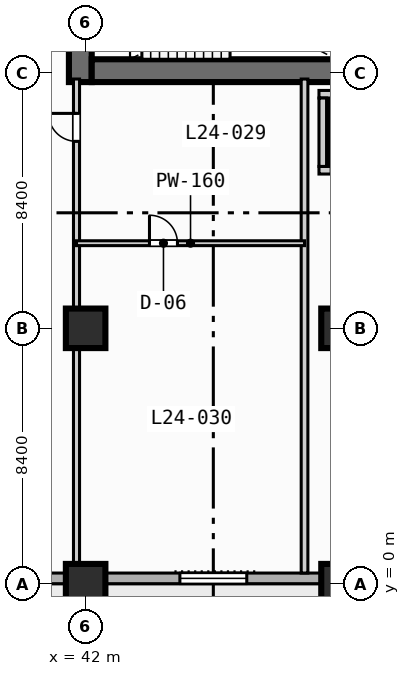
"""IFC4 building model, lengths in metres.
Left out: names, types, materials, properties, quantities, classifications, styles, units other than length and angle.
Written with IfcOpenShell. Run it as: python <this file> out.ifc"""

import sys

from ifc_helpers import new_model, si_unit, direction, frame, frame_2d, origin, origin_2d, place, context, subcontext, project, spatial, rectangle, extrude, element, fill, save


model = new_model("IFC4")
c1 = context("Model", 3, precision=1e-05, world=origin(), true_north=direction((0.0, 1.0)))
c2 = subcontext(c1, "Body", "Model", "MODEL_VIEW")
j1 = project(units=[si_unit("LENGTHUNIT", "METRE"), si_unit("PLANEANGLEUNIT", "RADIAN")], contexts=[c1])
p1 = place(None, origin())
s1 = spatial("IfcSite", under=j1, at=p1, CompositionType="ELEMENT")
p2 = place(p1, origin())
s2 = spatial("IfcBuilding", under=s1, at=p2, CompositionType="ELEMENT")
p3 = place(p2, frame((0.0, 0.0, 103.8)))
s3 = spatial("IfcBuildingStorey", under=s2, at=p3, CompositionType="ELEMENT", Elevation=103.8)
p4 = place(p3, frame((41.825, 16.5, 0.0), z_axis=(0.0, 0.0, 1.0), x_axis=(0.0, 1.0, 0.0)))
e1 = element("IfcWall", 1, at=p4, inside=s3, PredefinedType="SHEAR", context=c2, shape_type="SweptSolid", body=[
    extrude(rectangle(XDim=1.5, YDim=0.75, at=frame_2d((0.75, 0.0))), origin(), (0.0, 0.0, 1.0), 3.55),
])
p5 = place(p3, frame((42.2, 16.875, 0.0), z_axis=(0.0, 0.0, 1.0), x_axis=(1.0, 0.0, 0.0)))
e2 = element("IfcWall", 2, at=p5, inside=s3, PredefinedType="SHEAR", context=c2, shape_type="SweptSolid", body=[
    extrude(rectangle(XDim=16.35, YDim=0.75, at=frame_2d((8.175, 0.0))), origin(), (0.0, 0.0, 1.0), 3.55),
])
for number, where, z_axis, x_axis in (
    (3, (42.0, 0.0, 0.0), (0.0, 0.0, 1.0), (1.0, 0.0, 0.0)),
    (4, (42.0, 8.4, 0.0), (0.0, 0.0, 1.0), (1.0, 0.0, 0.0)),
    (5, (50.4, 0.0, 0.0), (0.0, 0.0, 1.0), (1.0, 0.0, 0.0)),
    (6, (50.4, 8.4, 0.0), (0.0, 0.0, 1.0), (1.0, 0.0, 0.0)),
):
    element("IfcColumn", number, at=place(p3, frame(where, z_axis=z_axis, x_axis=x_axis)), inside=s3, PredefinedType="COLUMN", context=c2, shape_type="SweptSolid", body=[
        extrude(rectangle(XDim=1.3, YDim=1.3, at=origin_2d()), origin(), (0.0, 0.0, 1.0), 3.8),
    ])
p6 = place(p3, frame((72.425, 0.175, 0.0), z_axis=(0.0, 0.0, 1.0), x_axis=(-1.0, 0.0, 0.0)))
e7 = element("IfcWall", 7, at=p6, inside=s3, PredefinedType="STANDARD", context=c2, shape_type="SweptSolid", body=[
    extrude(rectangle(XDim=69.25, YDim=0.35, at=frame_2d((34.625, 0.0))), origin(), (0.0, 0.0, 1.0), 3.55),
])
p7 = place(p6, frame((50.225, 0.0, 0.0)))
e8 = element("IfcOpeningElement", 8, at=p7, cuts=e7, PredefinedType="OPENING", context=c2, shape_type="SweptSolid", body=[
    extrude(rectangle(XDim=1.4, YDim=2.2, at=frame_2d((0.7, 1.1))), frame((0.0, 0.185, 0.0), z_axis=(0.0, -1.0, 0.0), x_axis=(1.0, 0.0, 0.0)), (0.0, 0.0, 1.0), 0.37),
])
p8 = place(p6, frame((33.525, 0.0, 0.85)))
e9 = element("IfcOpeningElement", 9, at=p8, cuts=e7, PredefinedType="OPENING", context=c2, shape_type="SweptSolid", body=[
    extrude(rectangle(XDim=2.2, YDim=1.8, at=frame_2d((1.1, 0.9))), frame((0.0, 0.185, 0.0), z_axis=(0.0, -1.0, 0.0), x_axis=(1.0, 0.0, 0.0)), (0.0, 0.0, 1.0), 0.37),
])
p9 = place(p6, frame((25.125, 0.0, 0.85)))
e10 = element("IfcOpeningElement", 10, at=p9, cuts=e7, PredefinedType="OPENING", context=c2, shape_type="SweptSolid", body=[
    extrude(rectangle(XDim=2.2, YDim=1.8, at=frame_2d((1.1, 0.9))), frame((0.0, 0.185, 0.0), z_axis=(0.0, -1.0, 0.0), x_axis=(1.0, 0.0, 0.0)), (0.0, 0.0, 1.0), 0.37),
])
p10 = place(p6, frame((8.325, 0.0, 0.85)))
e11 = element("IfcOpeningElement", 11, at=p10, cuts=e7, PredefinedType="OPENING", context=c2, shape_type="SweptSolid", body=[
    extrude(rectangle(XDim=2.2, YDim=1.8, at=frame_2d((1.1, 0.9))), frame((0.0, 0.185, 0.0), z_axis=(0.0, -1.0, 0.0), x_axis=(1.0, 0.0, 0.0)), (0.0, 0.0, 1.0), 0.37),
])
p11 = place(p6, frame((64.925, 0.0, 0.85)))
e12 = element("IfcOpeningElement", 12, at=p11, cuts=e7, PredefinedType="OPENING", context=c2, shape_type="SweptSolid", body=[
    extrude(rectangle(XDim=1.8, YDim=1.8, at=frame_2d((0.9, 0.9))), frame((0.0, 0.185, 0.0), z_axis=(0.0, -1.0, 0.0), x_axis=(1.0, 0.0, 0.0)), (0.0, 0.0, 1.0), 0.37),
])
p12 = place(p6, frame((56.525, 0.0, 0.85)))
e13 = element("IfcOpeningElement", 13, at=p12, cuts=e7, PredefinedType="OPENING", context=c2, shape_type="SweptSolid", body=[
    extrude(rectangle(XDim=1.8, YDim=1.8, at=frame_2d((0.9, 0.9))), frame((0.0, 0.185, 0.0), z_axis=(0.0, -1.0, 0.0), x_axis=(1.0, 0.0, 0.0)), (0.0, 0.0, 1.0), 0.37),
])
p13 = place(p6, frame((2.125, 0.0, 0.85)))
e14 = element("IfcOpeningElement", 14, at=p13, cuts=e7, PredefinedType="OPENING", context=c2, shape_type="SweptSolid", body=[
    extrude(rectangle(XDim=1.8, YDim=1.8, at=frame_2d((0.9, 0.9))), frame((0.0, 0.185, 0.0), z_axis=(0.0, -1.0, 0.0), x_axis=(1.0, 0.0, 0.0)), (0.0, 0.0, 1.0), 0.37),
])
p14 = place(p3, frame((49.675, 13.6, 0.0), z_axis=(0.0, 0.0, 1.0), x_axis=(1.0, 0.0, 0.0)))
e15 = element("IfcWall", 15, at=p14, inside=s3, PredefinedType="SOLIDWALL", context=c2, shape_type="SweptSolid", body=[
    extrude(rectangle(XDim=2.25, YDim=0.25, at=frame_2d((1.125, 0.0))), origin(), (0.0, 0.0, 1.0), 3.55),
])
p15 = place(p14, frame((0.4, 0.0, 0.0)))
e16 = element("IfcOpeningElement", 16, at=p15, cuts=e15, PredefinedType="OPENING", context=c2, shape_type="SweptSolid", body=[
    extrude(rectangle(XDim=1.1, YDim=2.15, at=frame_2d((0.55, 1.075))), frame((0.0, 0.135, 0.0), z_axis=(0.0, -1.0, 0.0), x_axis=(1.0, 0.0, 0.0)), (0.0, 0.0, 1.0), 0.27),
])
for number, where, z_axis, x_axis in (
    (17, (49.675, 16.1, 0.0), (0.0, 0.0, 1.0), (1.0, 0.0, 0.0)),
    (18, (49.8, 13.725, 0.0), (0.0, 0.0, 1.0), (0.0, 1.0, 0.0)),
):
    element("IfcWall", number, at=place(p3, frame(where, z_axis=z_axis, x_axis=x_axis)), inside=s3, PredefinedType="SOLIDWALL", context=c2, shape_type="SweptSolid", body=[
        extrude(rectangle(XDim=2.25, YDim=0.25, at=frame_2d((1.125, 0.0))), origin(), (0.0, 0.0, 1.0), 3.55),
    ])
p16 = place(p3, frame((41.7, 0.35, 0.0), z_axis=(0.0, 0.0, 1.0), x_axis=(0.0, 1.0, 0.0)))
e19 = element("IfcWall", 19, at=p16, inside=s3, PredefinedType="PARTITIONING", context=c2, shape_type="SweptSolid", body=[
    extrude(rectangle(XDim=16.25, YDim=0.2, at=frame_2d((8.125, 0.0))), origin(), (0.0, 0.0, 1.0), 2.8),
])
p17 = place(p16, frame((14.2, 0.0, 0.0)))
e20 = element("IfcOpeningElement", 20, at=p17, cuts=e19, PredefinedType="OPENING", context=c2, shape_type="SweptSolid", body=[
    extrude(rectangle(XDim=0.92, YDim=2.1, at=frame_2d((0.46, 1.05))), frame((0.0, 0.11, 0.0), z_axis=(0.0, -1.0, 0.0), x_axis=(1.0, 0.0, 0.0)), (0.0, 0.0, 1.0), 0.22),
])
p18 = place(p3, frame((49.2, 0.35, 0.0), z_axis=(0.0, 0.0, 1.0), x_axis=(0.0, 1.0, 0.0)))
e21 = element("IfcWall", 21, at=p18, inside=s3, PredefinedType="PARTITIONING", context=c2, shape_type="SweptSolid", body=[
    extrude(rectangle(XDim=16.25, YDim=0.22, at=frame_2d((8.125, 0.0))), origin(), (0.0, 0.0, 1.0), 3.55),
])
p19 = place(p3, frame((41.7, 11.2, 0.0), z_axis=(0.0, 0.0, 1.0), x_axis=(1.0, 0.0, 0.0)))
e22 = element("IfcWall", 22, at=p19, inside=s3, PredefinedType="PARTITIONING", context=c2, shape_type="SweptSolid", body=[
    extrude(rectangle(XDim=7.5, YDim=0.16, at=frame_2d((3.75, 0.0))), origin(), (0.0, 0.0, 1.0), 3.55),
])
p20 = place(p19, frame((2.4, 0.0, 0.0)))
e23 = element("IfcOpeningElement", 23, at=p20, cuts=e22, PredefinedType="OPENING", context=c2, shape_type="SweptSolid", body=[
    extrude(rectangle(XDim=0.92, YDim=2.1, at=frame_2d((0.46, 1.05))), frame((0.0, 0.09, 0.0), z_axis=(0.0, -1.0, 0.0), x_axis=(1.0, 0.0, 0.0)), (0.0, 0.0, 1.0), 0.18),
])
p21 = place(p9, origin())
e24 = element("IfcWindow", 24, at=p21, inside=s3, PartitioningType="SINGLE_PANEL", PredefinedType="WINDOW", context=c2, shape_type="SweptSolid", body=[
    extrude(rectangle(XDim=2.2, YDim=1.8, at=frame_2d((1.1, 0.9))), frame((0.0, 0.03, 0.0), z_axis=(0.0, -1.0, 0.0), x_axis=(1.0, 0.0, 0.0)), (0.0, 0.0, 1.0), 0.06),
])
fill(e10, e24)
p22 = place(p17, origin())
e25 = element("IfcDoor", 25, at=p22, inside=s3, OperationType="SINGLE_SWING_RIGHT", PredefinedType="DOOR", context=c2, shape_type="SweptSolid", body=[
    extrude(rectangle(XDim=0.92, YDim=2.1, at=frame_2d((0.46, 1.05))), frame((0.0, 0.025, 0.0), z_axis=(0.0, -1.0, 0.0), x_axis=(1.0, 0.0, 0.0)), (0.0, 0.0, 1.0), 0.05),
])
fill(e20, e25)
p23 = place(p20, origin())
e26 = element("IfcDoor", 26, at=p23, inside=s3, OperationType="SINGLE_SWING_LEFT", PredefinedType="DOOR", context=c2, shape_type="SweptSolid", body=[
    extrude(rectangle(XDim=0.92, YDim=2.1, at=frame_2d((0.46, 1.05))), frame((0.0, 0.025, 0.0), z_axis=(0.0, -1.0, 0.0), x_axis=(1.0, 0.0, 0.0)), (0.0, 0.0, 1.0), 0.05),
])
fill(e23, e26)
save(model, sys.argv[1])
